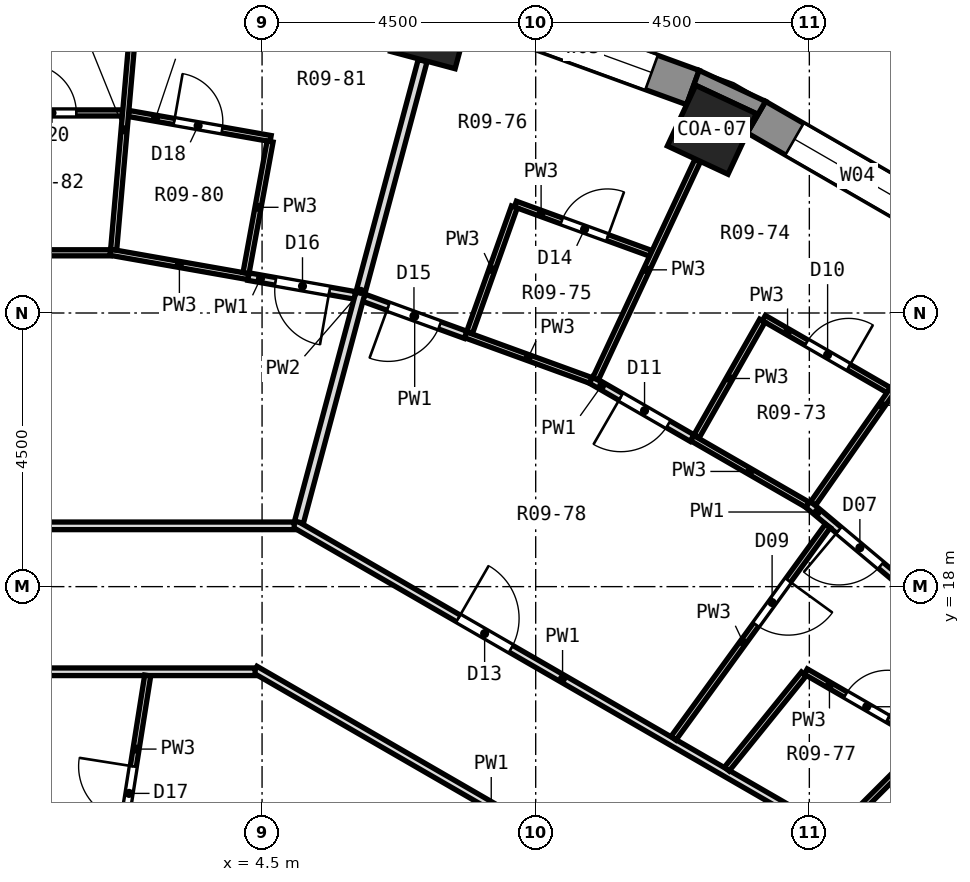
"""IFC4 building model, lengths in metres.
Left out: names, types, materials, properties, quantities, classifications, styles, units other than length and angle.
Written with IfcOpenShell. Run it as: python <this file> out.ifc"""

import sys

from ifc_helpers import new_model, si_unit, direction, frame, frame_2d, origin, origin_2d, place, context, subcontext, project, spatial, polyline, rectangle, outline, extrude, element, fill, save


model = new_model("IFC4")
c1 = context("Model", 3, precision=1e-05, world=origin(), true_north=direction((0.0, 1.0)))
c2 = subcontext(c1, "Body", "Model", "MODEL_VIEW")
j1 = project(units=[si_unit("LENGTHUNIT", "METRE"), si_unit("PLANEANGLEUNIT", "RADIAN")], contexts=[c1])
p1 = place(None, origin())
s1 = spatial("IfcSite", under=j1, at=p1, CompositionType="ELEMENT")
p2 = place(p1, origin())
s2 = spatial("IfcBuilding", under=s1, at=p2, CompositionType="ELEMENT")
p3 = place(p2, frame((0.0, 0.0, 26.3)))
s3 = spatial("IfcBuildingStorey", under=s2, at=p3, CompositionType="ELEMENT", Elevation=26.3)
p4 = place(p3, frame((11.897, 25.512, 0.0), z_axis=(0.0, 0.0, 1.0), x_axis=(0.422618261741, 0.906307787037, 0.0)))
e1 = element("IfcColumn", 1, at=p4, inside=s3, PredefinedType="COLUMN", context=c2, shape_type="SweptSolid", body=[
    extrude(rectangle(XDim=1.1, YDim=1.1, at=origin_2d()), origin(), (0.0, 0.0, 1.0), 3.3),
])
p5 = place(p3, frame((7.286, 27.191, -1.05), z_axis=(0.0, 0.0, 1.0), x_axis=(0.258819045103, 0.965925826289, 0.0)))
e2 = element("IfcColumn", 2, at=p5, inside=s3, PredefinedType="COLUMN", context=c2, shape_type="SweptSolid", body=[
    extrude(rectangle(XDim=1.1, YDim=1.1, at=origin_2d()), origin(), (0.0, 0.0, 1.0), 4.35),
])
p6 = place(p3, frame((15.96, 23.798, 0.0), z_axis=(0.0, 0.0, 1.0), x_axis=(-0.86603124159, 0.499989888488, 0.0)))
e3 = element("IfcWall", 3, at=p6, inside=s3, PredefinedType="SOLIDWALL", context=c2, shape_type="SweptSolid", body=[
    extrude(rectangle(XDim=3.846, YDim=0.6, at=frame_2d((1.923, 0.0))), origin(), (0.0, 0.0, 1.0), 2.75),
])
p7 = place(p6, frame((0.723, 0.0, 0.9)))
e4 = element("IfcOpeningElement", 4, at=p7, cuts=e3, PredefinedType="OPENING", context=c2, shape_type="SweptSolid", body=[
    extrude(rectangle(XDim=2.4, YDim=1.8, at=frame_2d((1.2, 0.9))), frame((0.0, 0.312, 0.0), z_axis=(0.0, -1.0, 0.0), x_axis=(1.0, 0.0, 0.0)), (0.0, 0.0, 1.0), 0.624),
])
p8 = place(p3, frame((11.585, 26.208, 0.0), z_axis=(0.0, 0.0, 1.0), x_axis=(-0.939689588564, 0.342028474173, 0.0)))
e5 = element("IfcWall", 5, at=p8, inside=s3, PredefinedType="SOLIDWALL", context=c2, shape_type="SweptSolid", body=[
    extrude(rectangle(XDim=3.846, YDim=0.6, at=frame_2d((1.923, 0.0))), origin(), (0.0, 0.0, 1.0), 2.75),
])
p9 = place(p8, frame((0.723, 0.0, 0.9)))
e6 = element("IfcOpeningElement", 6, at=p9, cuts=e5, PredefinedType="OPENING", context=c2, shape_type="SweptSolid", body=[
    extrude(rectangle(XDim=2.4, YDim=1.8, at=frame_2d((1.2, 0.9))), frame((0.0, 0.312, 0.0), z_axis=(0.0, -1.0, 0.0), x_axis=(1.0, 0.0, 0.0)), (0.0, 0.0, 1.0), 0.624),
])
p10 = place(p3, origin())
e7 = element("IfcWall", 7, at=p10, inside=s3, PredefinedType="SOLIDWALL", context=c2, shape_type="SweptSolid", body=[
    extrude(outline(polyline([(11.688, 26.49), (11.483, 25.926), (11.631, 26.243), (12.628, 25.779), (12.479, 25.461), (12.78, 25.981), (11.688, 26.49)])), origin(), (0.0, 0.0, 1.0), 2.75),
])
p11 = place(p3, frame((13.476, 19.356, 0.0), z_axis=(0.0, 0.0, 1.0), x_axis=(0.76614099915, -0.642672521135, 0.0)))
e8 = element("IfcWall", 8, at=p11, inside=s3, PredefinedType="PARTITIONING", context=c2, shape_type="SweptSolid", body=[
    extrude(rectangle(XDim=1.918, YDim=0.125, at=frame_2d((0.959, 0.0))), origin(), (0.0, 0.0, 1.0), 2.75),
])
p12 = place(p11, frame((0.666, 0.0, 0.0)))
e9 = element("IfcOpeningElement", 9, at=p12, cuts=e8, PredefinedType="OPENING", context=c2, shape_type="SweptSolid", body=[
    extrude(rectangle(XDim=0.9, YDim=2.1, at=frame_2d((0.45, 1.05))), frame((0.0, 0.074, 0.0), z_axis=(0.0, -1.0, 0.0), x_axis=(1.0, 0.0, 0.0)), (0.0, 0.0, 1.0), 0.149),
])
p13 = place(p3, frame((4.385, 16.636, 0.0), z_axis=(0.0, 0.0, 1.0), x_axis=(0.866033263559, -0.499986386223, 0.0)))
e10 = element("IfcWall", 10, at=p13, inside=s3, PredefinedType="PARTITIONING", context=c2, shape_type="SweptSolid", body=[
    extrude(rectangle(XDim=8.968, YDim=0.125, at=frame_2d((4.484, 0.0))), origin(), (0.0, 0.0, 1.0), 2.75),
])
p14 = place(p3, frame((5.029, 19.036, 0.0), z_axis=(0.0, 0.0, 1.0), x_axis=(0.866024825845, -0.50000100102, 0.0)))
e11 = element("IfcWall", 11, at=p14, inside=s3, PredefinedType="PARTITIONING", context=c2, shape_type="SweptSolid", body=[
    extrude(rectangle(XDim=10.192, YDim=0.125, at=frame_2d((5.096, 0.0))), origin(), (0.0, 0.0, 1.0), 2.75),
])
p15 = place(p14, frame((3.116, 0.0, 0.0)))
e12 = element("IfcOpeningElement", 12, at=p15, cuts=e11, PredefinedType="OPENING", context=c2, shape_type="SweptSolid", body=[
    extrude(rectangle(XDim=1.0, YDim=2.1, at=frame_2d((0.5, 1.05))), frame((0.0, 0.074, 0.0), z_axis=(0.0, -1.0, 0.0), x_axis=(1.0, 0.0, 0.0)), (0.0, 0.0, 1.0), 0.149),
])
p16 = place(p3, frame((13.441, 16.604, 0.0), z_axis=(0.0, 0.0, 1.0), x_axis=(0.865969595378, -0.500096650539, 0.0)))
e13 = element("IfcWall", 13, at=p16, inside=s3, PredefinedType="PARTITIONING", context=c2, shape_type="SweptSolid", body=[
    extrude(rectangle(XDim=2.315, YDim=0.1, at=frame_2d((1.158, 0.0))), origin(), (0.0, 0.0, 1.0), 2.75),
])
p17 = place(p16, frame((0.758, 0.0, 0.0)))
e14 = element("IfcOpeningElement", 14, at=p17, cuts=e13, PredefinedType="OPENING", context=c2, shape_type="SweptSolid", body=[
    extrude(rectangle(XDim=0.8, YDim=2.1, at=frame_2d((0.4, 1.05))), frame((0.0, 0.062, 0.0), z_axis=(0.0, -1.0, 0.0), x_axis=(1.0, 0.0, 0.0)), (0.0, 0.0, 1.0), 0.124),
])
p18 = place(p3, frame((11.572, 20.443, 0.0), z_axis=(0.0, 0.0, 1.0), x_axis=(0.865939000713, -0.500149624657, 0.0)))
e15 = element("IfcWall", 15, at=p18, inside=s3, PredefinedType="PARTITIONING", context=c2, shape_type="SweptSolid", body=[
    extrude(rectangle(XDim=2.193, YDim=0.1, at=frame_2d((1.097, 0.0))), origin(), (0.0, 0.0, 1.0), 2.75),
])
p19 = place(p3, frame((9.91, 21.402, 0.0), z_axis=(0.0, 0.0, 1.0), x_axis=(0.866191941426, -0.499711437341, 0.0)))
e16 = element("IfcWall", 16, at=p19, inside=s3, PredefinedType="PARTITIONING", context=c2, shape_type="SweptSolid", body=[
    extrude(rectangle(XDim=1.919, YDim=0.125, at=frame_2d((0.959, 0.0))), origin(), (0.0, 0.0, 1.0), 2.75),
])
p20 = place(p19, frame((0.566, 0.0, 0.0)))
e17 = element("IfcOpeningElement", 17, at=p20, cuts=e16, PredefinedType="OPENING", context=c2, shape_type="SweptSolid", body=[
    extrude(rectangle(XDim=0.9, YDim=2.1, at=frame_2d((0.45, 1.05))), frame((0.0, 0.074, 0.0), z_axis=(0.0, -1.0, 0.0), x_axis=(1.0, 0.0, 0.0)), (0.0, 0.0, 1.0), 0.149),
])
p21 = place(p3, frame((12.752, 22.417, 0.0), z_axis=(0.0, 0.0, 1.0), x_axis=(0.865984969814, -0.500070027153, 0.0)))
e18 = element("IfcWall", 18, at=p21, inside=s3, PredefinedType="PARTITIONING", context=c2, shape_type="SweptSolid", body=[
    extrude(rectangle(XDim=2.371, YDim=0.1, at=frame_2d((1.186, 0.0))), origin(), (0.0, 0.0, 1.0), 2.75),
])
p22 = place(p21, frame((0.811, 0.0, 0.0)))
e19 = element("IfcOpeningElement", 19, at=p22, cuts=e18, PredefinedType="OPENING", context=c2, shape_type="SweptSolid", body=[
    extrude(rectangle(XDim=0.8, YDim=2.1, at=frame_2d((0.4, 1.05))), frame((0.0, 0.062, 0.0), z_axis=(0.0, -1.0, 0.0), x_axis=(1.0, 0.0, 0.0)), (0.0, 0.0, 1.0), 0.124),
])
p23 = place(p3, frame((7.846, 22.141, 0.0), z_axis=(0.0, 0.0, 1.0), x_axis=(0.939712116987, -0.341966573204, 0.0)))
e20 = element("IfcWall", 20, at=p23, inside=s3, PredefinedType="PARTITIONING", context=c2, shape_type="SweptSolid", body=[
    extrude(rectangle(XDim=2.192, YDim=0.1, at=frame_2d((1.096, 0.0))), origin(), (0.0, 0.0, 1.0), 2.75),
])
p24 = place(p3, frame((6.174, 22.75, 0.0), z_axis=(0.0, 0.0, 1.0), x_axis=(0.939613069721, -0.342238629044, 0.0)))
e21 = element("IfcWall", 21, at=p24, inside=s3, PredefinedType="PARTITIONING", context=c2, shape_type="SweptSolid", body=[
    extrude(rectangle(XDim=1.78, YDim=0.125, at=frame_2d((0.89, 0.0))), origin(), (0.0, 0.0, 1.0), 2.75),
])
p25 = place(p24, frame((0.427, 0.0, 0.0)))
e22 = element("IfcOpeningElement", 22, at=p25, cuts=e21, PredefinedType="OPENING", context=c2, shape_type="SweptSolid", body=[
    extrude(rectangle(XDim=0.9, YDim=2.1, at=frame_2d((0.45, 1.05))), frame((0.0, 0.074, 0.0), z_axis=(0.0, -1.0, 0.0), x_axis=(1.0, 0.0, 0.0)), (0.0, 0.0, 1.0), 0.149),
])
p26 = place(p3, frame((8.666, 24.291, 0.0), z_axis=(0.0, 0.0, 1.0), x_axis=(0.939700179596, -0.341999374952, 0.0)))
e23 = element("IfcWall", 23, at=p26, inside=s3, PredefinedType="PARTITIONING", context=c2, shape_type="SweptSolid", body=[
    extrude(rectangle(XDim=2.371, YDim=0.1, at=frame_2d((1.186, 0.0))), origin(), (0.0, 0.0, 1.0), 2.75),
])
p27 = place(p26, frame((0.811, 0.0, 0.0)))
e24 = element("IfcOpeningElement", 24, at=p27, cuts=e23, PredefinedType="OPENING", context=c2, shape_type="SweptSolid", body=[
    extrude(rectangle(XDim=0.8, YDim=2.1, at=frame_2d((0.4, 1.05))), frame((0.0, 0.062, 0.0), z_axis=(0.0, -1.0, 0.0), x_axis=(1.0, 0.0, 0.0)), (0.0, 0.0, 1.0), 0.124),
])
p28 = place(p3, frame((2.005, 23.499, 0.0), z_axis=(0.0, 0.0, 1.0), x_axis=(0.984814448646, -0.173610200557, 0.0)))
e25 = element("IfcWall", 25, at=p28, inside=s3, PredefinedType="PARTITIONING", context=c2, shape_type="SweptSolid", body=[
    extrude(rectangle(XDim=2.306, YDim=0.1, at=frame_2d((1.153, 0.0))), origin(), (0.0, 0.0, 1.0), 2.75),
])
p29 = place(p3, frame((4.276, 23.098, 0.0), z_axis=(0.0, 0.0, 1.0), x_axis=(0.984784939559, -0.173777509529, 0.0)))
e26 = element("IfcWall", 26, at=p29, inside=s3, PredefinedType="PARTITIONING", context=c2, shape_type="SweptSolid", body=[
    extrude(rectangle(XDim=1.78, YDim=0.125, at=frame_2d((0.89, 0.0))), origin(), (0.0, 0.0, 1.0), 2.75),
])
p30 = place(p29, frame((0.452, 0.0, 0.0)))
e27 = element("IfcOpeningElement", 27, at=p30, cuts=e26, PredefinedType="OPENING", context=c2, shape_type="SweptSolid", body=[
    extrude(rectangle(XDim=0.9, YDim=2.1, at=frame_2d((0.45, 1.05))), frame((0.0, 0.074, 0.0), z_axis=(0.0, -1.0, 0.0), x_axis=(1.0, 0.0, 0.0)), (0.0, 0.0, 1.0), 0.149),
])
p31 = place(p3, frame((2.305, 25.781, 0.0), z_axis=(0.0, 0.0, 1.0), x_axis=(0.984774232096, -0.17383817705, 0.0)))
e28 = element("IfcWall", 28, at=p31, inside=s3, PredefinedType="PARTITIONING", context=c2, shape_type="SweptSolid", body=[
    extrude(rectangle(XDim=2.372, YDim=0.1, at=frame_2d((1.186, 0.0))), origin(), (0.0, 0.0, 1.0), 2.75),
])
p32 = place(p31, frame((0.761, 0.0, 0.0)))
e29 = element("IfcOpeningElement", 29, at=p32, cuts=e28, PredefinedType="OPENING", context=c2, shape_type="SweptSolid", body=[
    extrude(rectangle(XDim=0.8, YDim=2.1, at=frame_2d((0.4, 1.05))), frame((0.0, 0.062, 0.0), z_axis=(0.0, -1.0, 0.0), x_axis=(1.0, 0.0, 0.0)), (0.0, 0.0, 1.0), 0.124),
])
p33 = place(p3, frame((-4.52, 16.6, 0.0), z_axis=(0.0, 0.0, 1.0), x_axis=(1.0, 0.0, 0.0)))
e30 = element("IfcWall", 30, at=p33, inside=s3, PredefinedType="PARTITIONING", context=c2, shape_type="SweptSolid", body=[
    extrude(rectangle(XDim=8.906, YDim=0.125, at=frame_2d((4.453, 0.0))), origin(), (0.0, 0.0, 1.0), 2.75),
])
p34 = place(p3, frame((-5.163, 19.0, 0.0), z_axis=(0.0, 0.0, 1.0), x_axis=(1.0, 0.0, 0.0)))
e31 = element("IfcWall", 31, at=p34, inside=s3, PredefinedType="PARTITIONING", context=c2, shape_type="SweptSolid", body=[
    extrude(rectangle(XDim=10.192, YDim=0.125, at=frame_2d((5.096, 0.0))), origin(), (0.0, 0.0, 1.0), 2.75),
])
p35 = place(p3, frame((-0.1, 23.49, 0.0), z_axis=(0.0, 0.0, 1.0), x_axis=(1.0, 0.0, 0.0)))
e32 = element("IfcWall", 32, at=p35, inside=s3, PredefinedType="PARTITIONING", context=c2, shape_type="SweptSolid", body=[
    extrude(rectangle(XDim=2.105, YDim=0.1, at=frame_2d((1.052, 0.0))), origin(), (0.0, 0.0, 1.0), 2.75),
])
p36 = place(p3, frame((-0.115, 25.79, 0.0), z_axis=(0.0, 0.0, 1.0), x_axis=(1.0, 0.0, 0.0)))
e33 = element("IfcWall", 33, at=p36, inside=s3, PredefinedType="PARTITIONING", context=c2, shape_type="SweptSolid", body=[
    extrude(rectangle(XDim=2.321, YDim=0.1, at=frame_2d((1.161, 0.0))), origin(), (0.0, 0.0, 1.0), 2.75),
])
p37 = place(p36, frame((0.76, 0.0, 0.0)))
e34 = element("IfcOpeningElement", 34, at=p37, cuts=e33, PredefinedType="OPENING", context=c2, shape_type="SweptSolid", body=[
    extrude(rectangle(XDim=0.8, YDim=2.1, at=frame_2d((0.4, 1.05))), frame((0.0, 0.062, 0.0), z_axis=(0.0, -1.0, 0.0), x_axis=(1.0, 0.0, 0.0)), (0.0, 0.0, 1.0), 0.124),
])
p38 = place(p3, frame((13.953, 13.953, 0.0), z_axis=(0.0, 0.0, 1.0), x_axis=(0.707106781187, 0.707106781187, 0.0)))
e35 = element("IfcWall", 35, at=p38, inside=s3, PredefinedType="PARTITIONING", context=c2, shape_type="SweptSolid", body=[
    extrude(rectangle(XDim=2.061, YDim=0.1, at=frame_2d((1.031, 0.0))), origin(), (0.0, 0.0, 1.0), 2.75),
])
p39 = place(p3, frame((12.143, 15.0, 0.0), z_axis=(0.0, 0.0, 1.0), x_axis=(0.629135445443, 0.777295691026, 0.0)))
e36 = element("IfcWall", 36, at=p39, inside=s3, PredefinedType="PARTITIONING", context=c2, shape_type="SweptSolid", body=[
    extrude(rectangle(XDim=2.014, YDim=0.1, at=frame_2d((1.007, 0.0))), origin(), (0.0, 0.0, 1.0), 2.75),
])
p40 = place(p3, frame((11.266, 15.507, 0.0), z_axis=(0.0, 0.0, 1.0), x_axis=(0.587926223092, 0.808914554326, 0.0)))
e37 = element("IfcWall", 37, at=p40, inside=s3, PredefinedType="PARTITIONING", context=c2, shape_type="SweptSolid", body=[
    extrude(rectangle(XDim=4.317, YDim=0.1, at=frame_2d((2.159, 0.0))), origin(), (0.0, 0.0, 1.0), 2.75),
])
p41 = place(p40, frame((2.309, 0.0, 0.0)))
e38 = element("IfcOpeningElement", 38, at=p41, cuts=e37, PredefinedType="OPENING", context=c2, shape_type="SweptSolid", body=[
    extrude(rectangle(XDim=0.9, YDim=2.1, at=frame_2d((0.45, 1.05))), frame((0.0, 0.062, 0.0), z_axis=(0.0, -1.0, 0.0), x_axis=(1.0, 0.0, 0.0)), (0.0, 0.0, 1.0), 0.124),
])
p42 = place(p3, frame((13.561, 19.366, 0.0), z_axis=(0.0, 0.0, 1.0), x_axis=(0.573366885016, 0.819298733776, 0.0)))
e39 = element("IfcWall", 39, at=p42, inside=s3, PredefinedType="PARTITIONING", context=c2, shape_type="SweptSolid", body=[
    extrude(rectangle(XDim=3.948, YDim=0.1, at=frame_2d((1.974, 0.0))), origin(), (0.0, 0.0, 1.0), 2.75),
])
p43 = place(p3, frame((11.646, 20.472, 0.0), z_axis=(0.0, 0.0, 1.0), x_axis=(0.494394843989, 0.869237446408, 0.0)))
e40 = element("IfcWall", 40, at=p43, inside=s3, PredefinedType="PARTITIONING", context=c2, shape_type="SweptSolid", body=[
    extrude(rectangle(XDim=2.187, YDim=0.1, at=frame_2d((1.094, 0.0))), origin(), (0.0, 0.0, 1.0), 2.75),
])
p44 = place(p3, frame((9.984, 21.416, 0.0), z_axis=(0.0, 0.0, 1.0), x_axis=(0.423587219874, 0.905855323525, 0.0)))
e41 = element("IfcWall", 41, at=p44, inside=s3, PredefinedType="PARTITIONING", context=c2, shape_type="SweptSolid", body=[
    extrude(rectangle(XDim=3.961, YDim=0.1, at=frame_2d((1.98, 0.0))), origin(), (0.0, 0.0, 1.0), 2.75),
])
p45 = place(p3, frame((7.914, 22.183, 0.0), z_axis=(0.0, 0.0, 1.0), x_axis=(0.335940567571, 0.941883185464, 0.0)))
e42 = element("IfcWall", 42, at=p45, inside=s3, PredefinedType="PARTITIONING", context=c2, shape_type="SweptSolid", body=[
    extrude(rectangle(XDim=2.188, YDim=0.1, at=frame_2d((1.094, 0.0))), origin(), (0.0, 0.0, 1.0), 2.75),
])
p46 = place(p3, frame((5.107, 19.06, 0.0), z_axis=(0.0, 0.0, 1.0), x_axis=(0.258797692258, 0.965931547513, 0.0)))
e43 = element("IfcWall", 43, at=p46, inside=s3, PredefinedType="PARTITIONING", context=c2, shape_type="SweptSolid", body=[
    extrude(rectangle(XDim=7.857, YDim=0.15, at=frame_2d((3.929, 0.0))), origin(), (0.0, 0.0, 1.0), 2.75),
])
p47 = place(p3, frame((4.236, 23.156, 0.0), z_axis=(0.0, 0.0, 1.0), x_axis=(0.180037913286, 0.983659671726, 0.0)))
e44 = element("IfcWall", 44, at=p47, inside=s3, PredefinedType="PARTITIONING", context=c2, shape_type="SweptSolid", body=[
    extrude(rectangle(XDim=2.199, YDim=0.1, at=frame_2d((1.1, 0.0))), origin(), (0.0, 0.0, 1.0), 2.75),
])
p48 = place(p3, frame((2.006, 12.662, 0.0), z_axis=(0.0, 0.0, 1.0), x_axis=(0.15625323836, 0.987717027039, 0.0)))
e45 = element("IfcWall", 45, at=p48, inside=s3, PredefinedType="PARTITIONING", context=c2, shape_type="SweptSolid", body=[
    extrude(rectangle(XDim=3.925, YDim=0.1, at=frame_2d((1.962, 0.0))), origin(), (0.0, 0.0, 1.0), 2.75),
])
p49 = place(p48, frame((1.512, 0.0, 0.0)))
e46 = element("IfcOpeningElement", 46, at=p49, cuts=e45, PredefinedType="OPENING", context=c2, shape_type="SweptSolid", body=[
    extrude(rectangle(XDim=0.9, YDim=2.1, at=frame_2d((0.45, 1.05))), frame((0.0, 0.062, 0.0), z_axis=(0.0, -1.0, 0.0), x_axis=(1.0, 0.0, 0.0)), (0.0, 0.0, 1.0), 0.124),
])
p50 = place(p3, frame((2.059, 23.54, 0.0), z_axis=(0.0, 0.0, 1.0), x_axis=(0.087044593785, 0.996204416118, 0.0)))
e47 = element("IfcWall", 47, at=p50, inside=s3, PredefinedType="PARTITIONING", context=c2, shape_type="SweptSolid", body=[
    extrude(rectangle(XDim=3.96, YDim=0.1, at=frame_2d((1.98, 0.0))), origin(), (0.0, 0.0, 1.0), 2.75),
])
p51 = place(p7, origin())
e48 = element("IfcWindow", 48, at=p51, inside=s3, PartitioningType="SINGLE_PANEL", PredefinedType="WINDOW", context=c2, shape_type="SweptSolid", body=[
    extrude(rectangle(XDim=2.4, YDim=1.8, at=frame_2d((1.2, 0.9))), frame((0.0, 0.18, 0.0), z_axis=(0.0, -1.0, 0.0), x_axis=(1.0, 0.0, 0.0)), (0.0, 0.0, 1.0), 0.06),
])
fill(e4, e48)
p52 = place(p9, origin())
e49 = element("IfcWindow", 49, at=p52, inside=s3, PartitioningType="SINGLE_PANEL", PredefinedType="WINDOW", context=c2, shape_type="SweptSolid", body=[
    extrude(rectangle(XDim=2.4, YDim=1.8, at=frame_2d((1.2, 0.9))), frame((0.0, 0.18, 0.0), z_axis=(0.0, -1.0, 0.0), x_axis=(1.0, 0.0, 0.0)), (0.0, 0.0, 1.0), 0.06),
])
fill(e6, e49)
p53 = place(p17, origin())
e50 = element("IfcDoor", 50, at=p53, inside=s3, OperationType="SINGLE_SWING_RIGHT", PredefinedType="DOOR", context=c2, shape_type="SweptSolid", body=[
    extrude(rectangle(XDim=0.8, YDim=2.1, at=frame_2d((0.4, 1.05))), frame((0.0, 0.025, 0.0), z_axis=(0.0, -1.0, 0.0), x_axis=(1.0, 0.0, 0.0)), (0.0, 0.0, 1.0), 0.05),
])
fill(e14, e50)
p54 = place(p12, frame((0.9, 0.0, 0.0), z_axis=(0.0, 0.0, 1.0), x_axis=(-1.0, 0.0, 0.0)))
e51 = element("IfcDoor", 51, at=p54, inside=s3, OperationType="SINGLE_SWING_RIGHT", PredefinedType="DOOR", context=c2, shape_type="SweptSolid", body=[
    extrude(rectangle(XDim=0.9, YDim=2.1, at=frame_2d((0.45, 1.05))), frame((0.0, 0.025, 0.0), z_axis=(0.0, -1.0, 0.0), x_axis=(1.0, 0.0, 0.0)), (0.0, 0.0, 1.0), 0.05),
])
fill(e9, e51)
p55 = place(p41, frame((0.9, 0.0, 0.0), z_axis=(0.0, 0.0, 1.0), x_axis=(-1.0, 0.0, 0.0)))
e52 = element("IfcDoor", 52, at=p55, inside=s3, OperationType="SINGLE_SWING_LEFT", PredefinedType="DOOR", context=c2, shape_type="SweptSolid", body=[
    extrude(rectangle(XDim=0.9, YDim=2.1, at=frame_2d((0.45, 1.05))), frame((0.0, 0.025, 0.0), z_axis=(0.0, -1.0, 0.0), x_axis=(1.0, 0.0, 0.0)), (0.0, 0.0, 1.0), 0.05),
])
fill(e38, e52)
p56 = place(p22, origin())
e53 = element("IfcDoor", 53, at=p56, inside=s3, OperationType="SINGLE_SWING_RIGHT", PredefinedType="DOOR", context=c2, shape_type="SweptSolid", body=[
    extrude(rectangle(XDim=0.8, YDim=2.1, at=frame_2d((0.4, 1.05))), frame((0.0, 0.025, 0.0), z_axis=(0.0, -1.0, 0.0), x_axis=(1.0, 0.0, 0.0)), (0.0, 0.0, 1.0), 0.05),
])
fill(e19, e53)
p57 = place(p20, frame((0.9, 0.0, 0.0), z_axis=(0.0, 0.0, 1.0), x_axis=(-1.0, 0.0, 0.0)))
e54 = element("IfcDoor", 54, at=p57, inside=s3, OperationType="SINGLE_SWING_RIGHT", PredefinedType="DOOR", context=c2, shape_type="SweptSolid", body=[
    extrude(rectangle(XDim=0.9, YDim=2.1, at=frame_2d((0.45, 1.05))), frame((0.0, 0.025, 0.0), z_axis=(0.0, -1.0, 0.0), x_axis=(1.0, 0.0, 0.0)), (0.0, 0.0, 1.0), 0.05),
])
fill(e17, e54)
p58 = place(p15, origin())
e55 = element("IfcDoor", 55, at=p58, inside=s3, OperationType="SINGLE_SWING_LEFT", PredefinedType="DOOR", context=c2, shape_type="SweptSolid", body=[
    extrude(rectangle(XDim=1.0, YDim=2.1, at=frame_2d((0.5, 1.05))), frame((0.0, 0.025, 0.0), z_axis=(0.0, -1.0, 0.0), x_axis=(1.0, 0.0, 0.0)), (0.0, 0.0, 1.0), 0.05),
])
fill(e12, e55)
p59 = place(p27, origin())
e56 = element("IfcDoor", 56, at=p59, inside=s3, OperationType="SINGLE_SWING_RIGHT", PredefinedType="DOOR", context=c2, shape_type="SweptSolid", body=[
    extrude(rectangle(XDim=0.8, YDim=2.1, at=frame_2d((0.4, 1.05))), frame((0.0, 0.025, 0.0), z_axis=(0.0, -1.0, 0.0), x_axis=(1.0, 0.0, 0.0)), (0.0, 0.0, 1.0), 0.05),
])
fill(e24, e56)
p60 = place(p25, frame((0.9, 0.0, 0.0), z_axis=(0.0, 0.0, 1.0), x_axis=(-1.0, 0.0, 0.0)))
e57 = element("IfcDoor", 57, at=p60, inside=s3, OperationType="SINGLE_SWING_RIGHT", PredefinedType="DOOR", context=c2, shape_type="SweptSolid", body=[
    extrude(rectangle(XDim=0.9, YDim=2.1, at=frame_2d((0.45, 1.05))), frame((0.0, 0.025, 0.0), z_axis=(0.0, -1.0, 0.0), x_axis=(1.0, 0.0, 0.0)), (0.0, 0.0, 1.0), 0.05),
])
fill(e22, e57)
p61 = place(p30, frame((0.9, 0.0, 0.0), z_axis=(0.0, 0.0, 1.0), x_axis=(-1.0, 0.0, 0.0)))
e58 = element("IfcDoor", 58, at=p61, inside=s3, OperationType="SINGLE_SWING_LEFT", PredefinedType="DOOR", context=c2, shape_type="SweptSolid", body=[
    extrude(rectangle(XDim=0.9, YDim=2.1, at=frame_2d((0.45, 1.05))), frame((0.0, 0.025, 0.0), z_axis=(0.0, -1.0, 0.0), x_axis=(1.0, 0.0, 0.0)), (0.0, 0.0, 1.0), 0.05),
])
fill(e27, e58)
p62 = place(p49, origin())
e59 = element("IfcDoor", 59, at=p62, inside=s3, OperationType="SINGLE_SWING_RIGHT", PredefinedType="DOOR", context=c2, shape_type="SweptSolid", body=[
    extrude(rectangle(XDim=0.9, YDim=2.1, at=frame_2d((0.45, 1.05))), frame((0.0, 0.025, 0.0), z_axis=(0.0, -1.0, 0.0), x_axis=(1.0, 0.0, 0.0)), (0.0, 0.0, 1.0), 0.05),
])
fill(e46, e59)
p63 = place(p32, origin())
e60 = element("IfcDoor", 60, at=p63, inside=s3, OperationType="SINGLE_SWING_LEFT", PredefinedType="DOOR", context=c2, shape_type="SweptSolid", body=[
    extrude(rectangle(XDim=0.8, YDim=2.1, at=frame_2d((0.4, 1.05))), frame((0.0, 0.025, 0.0), z_axis=(0.0, -1.0, 0.0), x_axis=(1.0, 0.0, 0.0)), (0.0, 0.0, 1.0), 0.05),
])
fill(e29, e60)
p64 = place(p37, origin())
e61 = element("IfcDoor", 61, at=p64, inside=s3, OperationType="SINGLE_SWING_LEFT", PredefinedType="DOOR", context=c2, shape_type="SweptSolid", body=[
    extrude(rectangle(XDim=0.8, YDim=2.1, at=frame_2d((0.4, 1.05))), frame((0.0, 0.025, 0.0), z_axis=(0.0, -1.0, 0.0), x_axis=(1.0, 0.0, 0.0)), (0.0, 0.0, 1.0), 0.05),
])
fill(e34, e61)
save(model, sys.argv[1])
